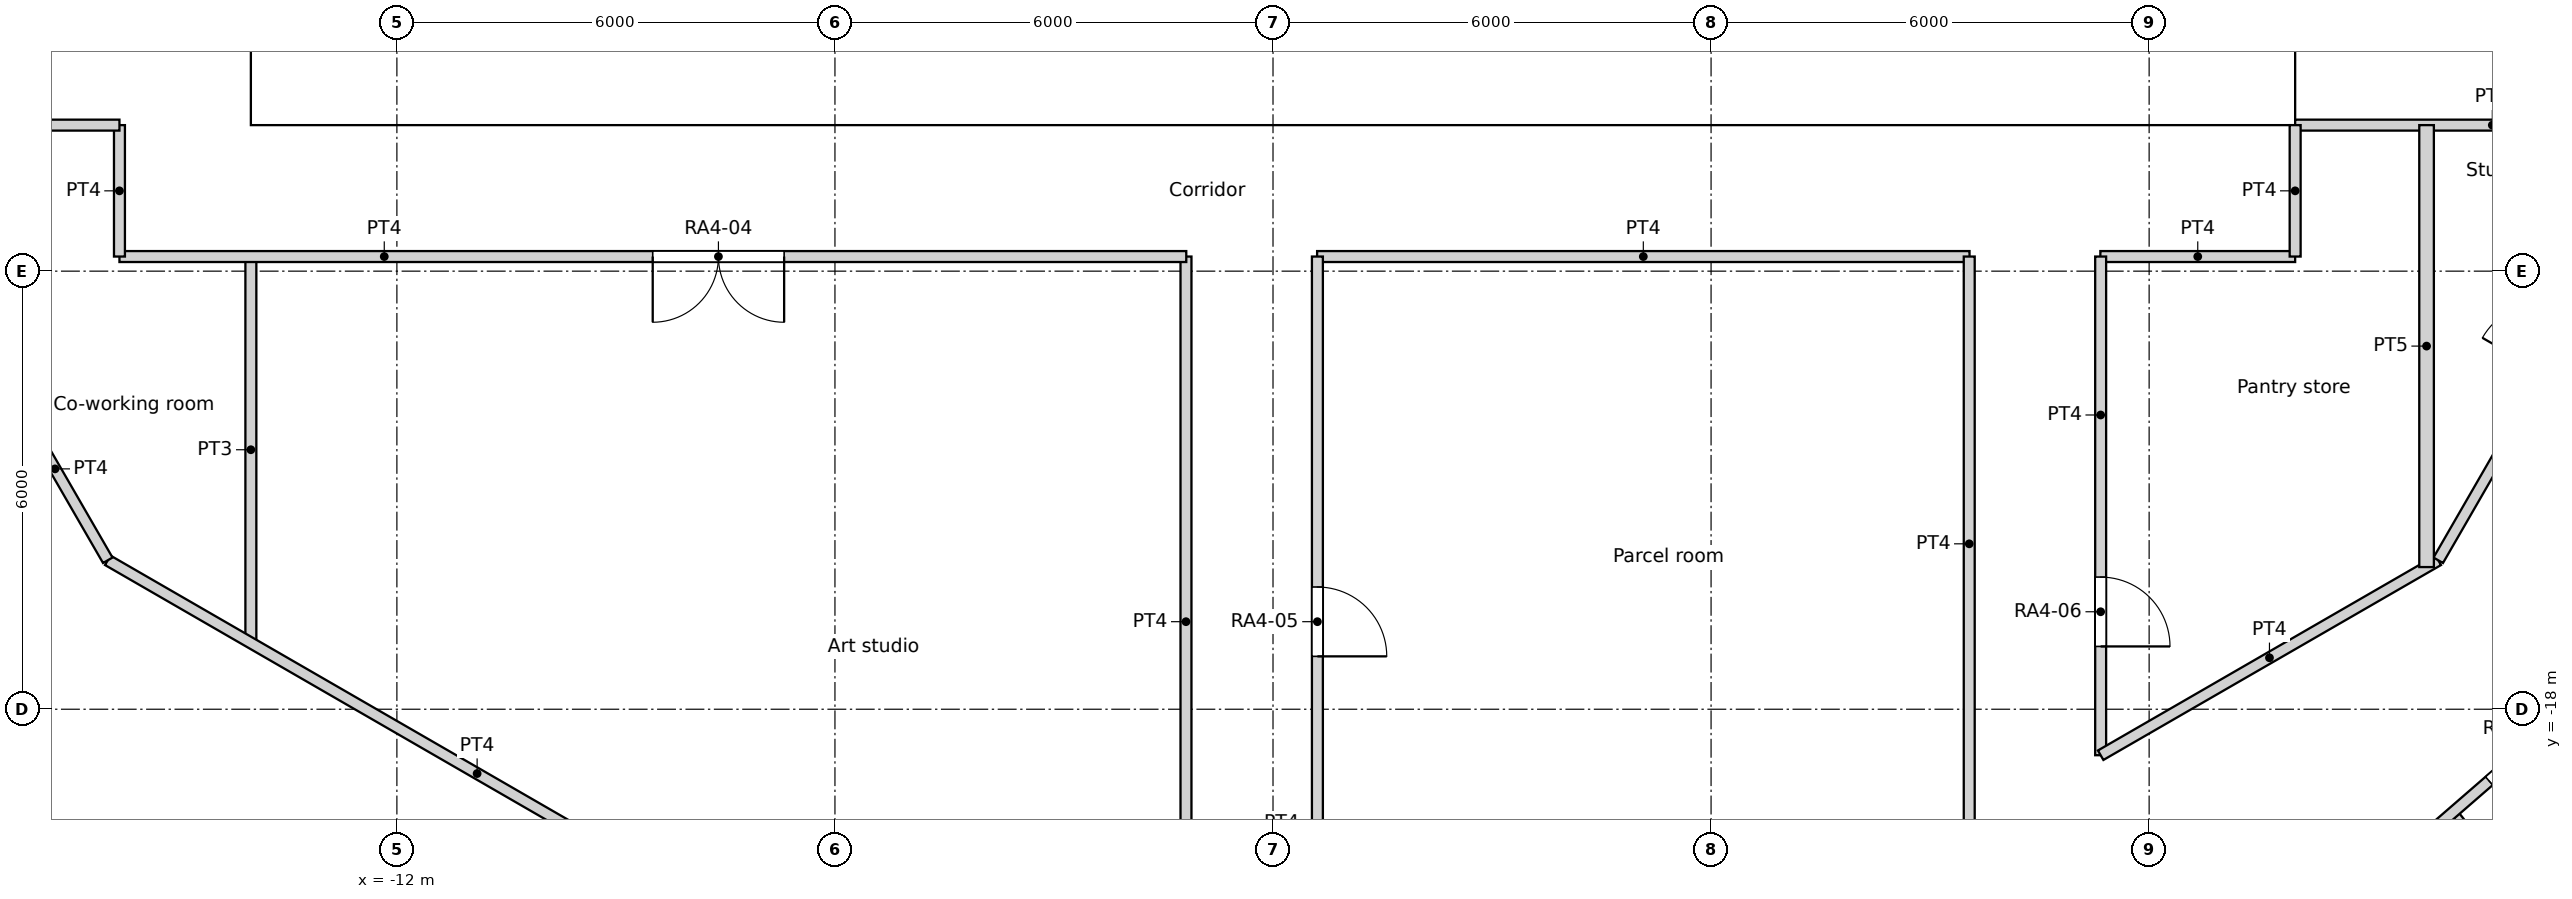
"""IFC4 building model, lengths in metres.
Left out: names, types, materials, properties, quantities, classifications, styles, units other than length and angle.
Written with IfcOpenShell. Run it as: python <this file> out.ifc"""

import sys

from ifc_helpers import new_model, si_unit, direction, frame, frame_2d, origin, origin_2d, place, context, subcontext, project, spatial, rectangle, circle, extrude, element, fill, save


model = new_model("IFC4")
c1 = context("Model", 3, precision=1e-05, world=origin(), true_north=direction((0.0, 1.0)))
c2 = subcontext(c1, "Body", "Model", "MODEL_VIEW")
j1 = project(units=[si_unit("LENGTHUNIT", "METRE"), si_unit("PLANEANGLEUNIT", "RADIAN")], contexts=[c1])
p1 = place(None, origin())
s1 = spatial("IfcSite", under=j1, at=p1, CompositionType="ELEMENT")
p2 = place(p1, origin())
s2 = spatial("IfcBuilding", under=s1, at=p2, CompositionType="ELEMENT")
p3 = place(p2, frame((0.0, 0.0, 60.6)))
s3 = spatial("IfcBuildingStorey", under=s2, at=p3, CompositionType="ELEMENT", Elevation=60.6)
for number, where, z_axis, x_axis in (
    (1, (-16.846, -17.855, 0.0), (0.0, 0.0, 1.0), (1.0, 0.0, 0.0)),
    (2, (14.659, -19.69, 0.0), (0.0, 0.0, 1.0), (1.0, 0.0, 0.0)),
):
    element("IfcColumn", number, at=place(p3, frame(where, z_axis=z_axis, x_axis=x_axis)), inside=s3, PredefinedType="COLUMN", context=c2, shape_type="SweptSolid", body=[
        extrude(circle(Radius=0.75, at=origin_2d()), origin(), (0.0, 0.0, 1.0), 3.6),
    ])
for number, where, z_axis, x_axis in (
    (3, (-13.798, -12.802, 0.0), (0.0, 0.0, 1.0), (1.0, 0.0, 0.0)),
    (4, (-9.411, -16.301, 0.0), (0.0, 0.0, 1.0), (1.0, 0.0, 0.0)),
    (5, (-4.188, -18.35, 0.0), (0.0, 0.0, 1.0), (1.0, 0.0, 0.0)),
    (6, (1.406, -18.77, 0.0), (0.0, 0.0, 1.0), (1.0, 0.0, 0.0)),
    (7, (6.876, -17.521, 0.0), (0.0, 0.0, 1.0), (1.0, 0.0, 0.0)),
    (8, (11.735, -14.716, 0.0), (0.0, 0.0, 1.0), (1.0, 0.0, 0.0)),
    (9, (15.552, -10.603, 0.0), (0.0, 0.0, 1.0), (1.0, 0.0, 0.0)),
):
    element("IfcColumn", number, at=place(p3, frame(where, z_axis=z_axis, x_axis=x_axis)), inside=s3, PredefinedType="COLUMN", context=c2, shape_type="SweptSolid", body=[
        extrude(circle(Radius=0.8, at=origin_2d()), origin(), (0.0, 0.0, 1.0), 3.6),
    ])
p4 = place(p3, frame((-14.0, -9.4, 0.0), z_axis=(0.0, 0.0, 1.0), x_axis=(1.0, 0.0, 0.0)))
e10 = element("IfcWall", 10, at=p4, inside=s3, PredefinedType="SOLIDWALL", context=c2, shape_type="SweptSolid", body=[
    extrude(rectangle(XDim=28.0, YDim=1.2, at=frame_2d((14.0, 0.0))), origin(), (0.0, 0.0, 1.0), 3.6),
])
p5 = place(p4, frame((14.9, 0.0, 0.0)))
e11 = element("IfcOpeningElement", 11, at=p5, cuts=e10, PredefinedType="OPENING", context=c2, shape_type="SweptSolid", body=[
    extrude(rectangle(XDim=1.0, YDim=2.1, at=frame_2d((0.5, 1.05))), frame((0.0, 0.6, 0.0), z_axis=(0.0, -1.0, 0.0), x_axis=(1.0, 0.0, 0.0)), (0.0, 0.0, 1.0), 1.2),
])
p6 = place(p4, frame((9.8, 0.0, 0.0)))
e12 = element("IfcOpeningElement", 12, at=p6, cuts=e10, PredefinedType="OPENING", context=c2, shape_type="SweptSolid", body=[
    extrude(rectangle(XDim=1.8, YDim=2.1, at=frame_2d((0.9, 1.05))), frame((0.0, 0.6, 0.0), z_axis=(0.0, -1.0, 0.0), x_axis=(1.0, 0.0, 0.0)), (0.0, 0.0, 1.0), 1.2),
])
p7 = place(p4, frame((16.4, 0.0, 0.0)))
e13 = element("IfcOpeningElement", 13, at=p7, cuts=e10, PredefinedType="OPENING", context=c2, shape_type="SweptSolid", body=[
    extrude(rectangle(XDim=1.8, YDim=2.1, at=frame_2d((0.9, 1.05))), frame((0.0, 0.6, 0.0), z_axis=(0.0, -1.0, 0.0), x_axis=(1.0, 0.0, 0.0)), (0.0, 0.0, 1.0), 1.2),
])
p8 = place(p3, frame((-15.8, -11.8, 0.0), z_axis=(0.0, 0.0, 1.0), x_axis=(1.0, 0.0, 0.0)))
e14 = element("IfcWall", 14, at=p8, inside=s3, PredefinedType="PARTITIONING", context=c2, shape_type="SweptSolid", body=[
    extrude(rectangle(XDim=14.612, YDim=0.15, at=frame_2d((7.306, 0.0))), origin(), (0.0, 0.0, 1.0), 3.15),
])
p9 = place(p8, frame((7.304, 0.0, 0.0)))
e15 = element("IfcOpeningElement", 15, at=p9, cuts=e14, PredefinedType="OPENING", context=c2, shape_type="SweptSolid", body=[
    extrude(rectangle(XDim=1.8, YDim=2.1, at=frame_2d((0.9, 1.05))), frame((0.0, 0.075, 0.0), z_axis=(0.0, -1.0, 0.0), x_axis=(1.0, 0.0, 0.0)), (0.0, 0.0, 1.0), 0.15),
])
p10 = place(p3, frame((0.604, -11.8, 0.0), z_axis=(0.0, 0.0, 1.0), x_axis=(1.0, 0.0, 0.0)))
e16 = element("IfcWall", 16, at=p10, inside=s3, PredefinedType="PARTITIONING", context=c2, shape_type="SweptSolid", body=[
    extrude(rectangle(XDim=8.936, YDim=0.15, at=frame_2d((4.468, 0.0))), origin(), (0.0, 0.0, 1.0), 3.15),
])
p11 = place(p3, frame((14.0, -11.8, 0.0), z_axis=(0.0, 0.0, 1.0), x_axis=(0.0, 1.0, 0.0)))
e17 = element("IfcWall", 17, at=p11, inside=s3, PredefinedType="PARTITIONING", context=c2, shape_type="SweptSolid", body=[
    extrude(rectangle(XDim=1.8, YDim=0.15, at=frame_2d((0.9, 0.0))), origin(), (0.0, 0.0, 1.0), 3.15),
])
p12 = place(p3, frame((11.332, -11.8, 0.0), z_axis=(0.0, 0.0, 1.0), x_axis=(1.0, 0.0, 0.0)))
e18 = element("IfcWall", 18, at=p12, inside=s3, PredefinedType="PARTITIONING", context=c2, shape_type="SweptSolid", body=[
    extrude(rectangle(XDim=2.668, YDim=0.15, at=frame_2d((1.334, 0.0))), origin(), (0.0, 0.0, 1.0), 3.15),
])
p13 = place(p3, frame((-15.8, -11.8, 0.0), z_axis=(0.0, 0.0, 1.0), x_axis=(0.0, 1.0, 0.0)))
e19 = element("IfcWall", 19, at=p13, inside=s3, PredefinedType="PARTITIONING", context=c2, shape_type="SweptSolid", body=[
    extrude(rectangle(XDim=1.8, YDim=0.15, at=frame_2d((0.9, 0.0))), origin(), (0.0, 0.0, 1.0), 3.15),
])
p14 = place(p3, frame((14.0, -10.0, 0.0), z_axis=(0.0, 0.0, 1.0), x_axis=(1.0, 0.0, 0.0)))
e20 = element("IfcWall", 20, at=p14, inside=s3, PredefinedType="PARTITIONING", context=c2, shape_type="SweptSolid", body=[
    extrude(rectangle(XDim=5.401, YDim=0.15, at=frame_2d((2.7, 0.0))), origin(), (0.0, 0.0, 1.0), 3.15),
])
p15 = place(p3, frame((15.96, -15.96, 0.0), z_axis=(0.0, 0.0, 1.0), x_axis=(0.499992689227, 0.86602962462, 0.0)))
e21 = element("IfcWall", 21, at=p15, inside=s3, PredefinedType="PARTITIONING", context=c2, shape_type="SweptSolid", body=[
    extrude(rectangle(XDim=6.882, YDim=0.15, at=frame_2d((3.441, 0.0))), origin(), (0.0, 0.0, 1.0), 3.15),
])
p16 = place(p15, frame((2.941, 0.0, 0.0)))
e22 = element("IfcOpeningElement", 22, at=p16, cuts=e21, PredefinedType="OPENING", context=c2, shape_type="SweptSolid", body=[
    extrude(rectangle(XDim=1.0, YDim=2.04, at=frame_2d((0.5, 1.02))), frame((0.0, 0.075, 0.0), z_axis=(0.0, -1.0, 0.0), x_axis=(1.0, 0.0, 0.0)), (0.0, 0.0, 1.0), 0.15),
])
p17 = place(p3, frame((13.247, -21.939, 0.0), z_axis=(0.0, 0.0, 1.0), x_axis=(0.755420750547, 0.655240024451, 0.0)))
e23 = element("IfcWall", 23, at=p17, inside=s3, PredefinedType="PARTITIONING", context=c2, shape_type="SweptSolid", body=[
    extrude(rectangle(XDim=11.771, YDim=0.15, at=frame_2d((5.885, 0.0))), origin(), (0.0, 0.0, 1.0), 3.15),
])
p18 = place(p17, frame((4.513, 0.0, 0.0)))
e24 = element("IfcOpeningElement", 24, at=p18, cuts=e23, PredefinedType="OPENING", context=c2, shape_type="SweptSolid", body=[
    extrude(rectangle(XDim=1.0, YDim=2.1, at=frame_2d((0.5, 1.05))), frame((0.0, 0.075, 0.0), z_axis=(0.0, -1.0, 0.0), x_axis=(1.0, 0.0, 0.0)), (0.0, 0.0, 1.0), 0.15),
])
p19 = place(p3, frame((-19.401, -10.0, 0.0), z_axis=(0.0, 0.0, 1.0), x_axis=(1.0, 0.0, 0.0)))
e25 = element("IfcWall", 25, at=p19, inside=s3, PredefinedType="PARTITIONING", context=c2, shape_type="SweptSolid", body=[
    extrude(rectangle(XDim=3.601, YDim=0.15, at=frame_2d((1.8, 0.0))), origin(), (0.0, 0.0, 1.0), 3.15),
])
p20 = place(p3, frame((-19.401, -10.0, 0.0), z_axis=(0.0, 0.0, 1.0), x_axis=(0.499992689227, -0.86602962462, 0.0)))
e26 = element("IfcWall", 26, at=p20, inside=s3, PredefinedType="PARTITIONING", context=c2, shape_type="SweptSolid", body=[
    extrude(rectangle(XDim=6.882, YDim=0.15, at=frame_2d((3.441, 0.0))), origin(), (0.0, 0.0, 1.0), 3.15),
])
p21 = place(p20, frame((2.941, 0.0, 0.0)))
e27 = element("IfcOpeningElement", 27, at=p21, cuts=e26, PredefinedType="OPENING", context=c2, shape_type="SweptSolid", body=[
    extrude(rectangle(XDim=1.0, YDim=2.04, at=frame_2d((0.5, 1.02))), frame((0.0, 0.075, 0.0), z_axis=(0.0, -1.0, 0.0), x_axis=(1.0, 0.0, 0.0)), (0.0, 0.0, 1.0), 0.15),
])
p22 = place(p3, frame((-15.96, -15.96, 0.0), z_axis=(0.0, 0.0, 1.0), x_axis=(0.866022730501, -0.500004630234, 0.0)))
e28 = element("IfcWall", 28, at=p22, inside=s3, PredefinedType="PARTITIONING", context=c2, shape_type="SweptSolid", body=[
    extrude(rectangle(XDim=11.684, YDim=0.15, at=frame_2d((5.842, 0.0))), origin(), (0.0, 0.0, 1.0), 3.15),
])
p23 = place(p3, frame((-1.192, -21.802, 0.0), z_axis=(0.0, 0.0, 1.0), x_axis=(0.0, 1.0, 0.0)))
e29 = element("IfcWall", 29, at=p23, inside=s3, PredefinedType="PARTITIONING", context=c2, shape_type="SweptSolid", body=[
    extrude(rectangle(XDim=10.002, YDim=0.15, at=frame_2d((5.001, 0.0))), origin(), (0.0, 0.0, 1.0), 3.15),
])
p24 = place(p3, frame((0.608, -21.802, 0.0), z_axis=(0.0, 0.0, 1.0), x_axis=(0.0, 1.0, 0.0)))
e30 = element("IfcWall", 30, at=p24, inside=s3, PredefinedType="PARTITIONING", context=c2, shape_type="SweptSolid", body=[
    extrude(rectangle(XDim=10.002, YDim=0.15, at=frame_2d((5.001, 0.0))), origin(), (0.0, 0.0, 1.0), 3.15),
])
p25 = place(p24, frame((4.526, 0.0, 0.0)))
e31 = element("IfcOpeningElement", 31, at=p25, cuts=e30, PredefinedType="OPENING", context=c2, shape_type="SweptSolid", body=[
    extrude(rectangle(XDim=0.95, YDim=2.1, at=frame_2d((0.475, 1.05))), frame((0.0, 0.075, 0.0), z_axis=(0.0, -1.0, 0.0), x_axis=(1.0, 0.0, 0.0)), (0.0, 0.0, 1.0), 0.15),
])
p26 = place(p3, frame((9.536, -19.669, 0.0), z_axis=(0.0, 0.0, 1.0), x_axis=(0.0, 1.0, 0.0)))
e32 = element("IfcWall", 32, at=p26, inside=s3, PredefinedType="PARTITIONING", context=c2, shape_type="SweptSolid", body=[
    extrude(rectangle(XDim=7.869, YDim=0.15, at=frame_2d((3.935, 0.0))), origin(), (0.0, 0.0, 1.0), 3.15),
])
p27 = place(p3, frame((11.336, -18.63, 0.0), z_axis=(0.0, 0.0, 1.0), x_axis=(0.0, 1.0, 0.0)))
e33 = element("IfcWall", 33, at=p27, inside=s3, PredefinedType="PARTITIONING", context=c2, shape_type="SweptSolid", body=[
    extrude(rectangle(XDim=6.83, YDim=0.15, at=frame_2d((3.415, 0.0))), origin(), (0.0, 0.0, 1.0), 3.15),
])
p28 = place(p27, frame((1.49, 0.0, 0.0)))
e34 = element("IfcOpeningElement", 34, at=p28, cuts=e33, PredefinedType="OPENING", context=c2, shape_type="SweptSolid", body=[
    extrude(rectangle(XDim=0.95, YDim=2.1, at=frame_2d((0.475, 1.05))), frame((0.0, 0.075, 0.0), z_axis=(0.0, -1.0, 0.0), x_axis=(1.0, 0.0, 0.0)), (0.0, 0.0, 1.0), 0.15),
])
p29 = place(p3, frame((11.336, -18.63, 0.0), z_axis=(0.0, 0.0, 1.0), x_axis=(0.866056911224, 0.499945423543, 0.0)))
e35 = element("IfcWall", 35, at=p29, inside=s3, PredefinedType="PARTITIONING", context=c2, shape_type="SweptSolid", body=[
    extrude(rectangle(XDim=5.339, YDim=0.15, at=frame_2d((2.67, 0.0))), origin(), (0.0, 0.0, 1.0), 3.15),
])
p30 = place(p3, frame((-14.0, -17.092, 0.0), z_axis=(0.0, 0.0, 1.0), x_axis=(0.0, 1.0, 0.0)))
e36 = element("IfcWall", 36, at=p30, inside=s3, PredefinedType="PARTITIONING", context=c2, shape_type="SweptSolid", body=[
    extrude(rectangle(XDim=5.292, YDim=0.15, at=frame_2d((2.646, 0.0))), origin(), (0.0, 0.0, 1.0), 3.15),
])
p31 = place(p3, frame((15.8, -16.053, 0.0), z_axis=(0.0, 0.0, 1.0), x_axis=(0.0, 1.0, 0.0)))
e37 = element("IfcWall", 37, at=p31, inside=s3, PredefinedType="PARTITIONING", context=c2, shape_type="SweptSolid", body=[
    extrude(rectangle(XDim=6.053, YDim=0.2, at=frame_2d((3.026, 0.0))), origin(), (0.0, 0.0, 1.0), 3.15),
])
p32 = place(p3, frame((16.168, -19.404, 0.0), z_axis=(0.0, 0.0, 1.0), x_axis=(0.618142414415, -0.786066126672, 0.0)))
e38 = element("IfcWall", 38, at=p32, inside=s3, PredefinedType="PARTITIONING", context=c2, shape_type="SweptSolid", body=[
    extrude(rectangle(XDim=2.453, YDim=0.1, at=frame_2d((1.226, 0.0))), origin(), (0.0, 0.0, 1.0), 3.15),
])
p33 = place(p32, frame((0.777, 0.0, 0.0)))
e39 = element("IfcOpeningElement", 39, at=p33, cuts=e38, PredefinedType="OPENING", context=c2, shape_type="SweptSolid", body=[
    extrude(rectangle(XDim=0.9, YDim=2.04, at=frame_2d((0.45, 1.02))), frame((0.0, 0.05, 0.0), z_axis=(0.0, -1.0, 0.0), x_axis=(1.0, 0.0, 0.0)), (0.0, 0.0, 1.0), 0.1),
])
p34 = place(p5, origin())
e40 = element("IfcDoor", 40, at=p34, inside=s3, OperationType="SINGLE_SWING_LEFT", PredefinedType="DOOR", context=c2, shape_type="SweptSolid", body=[
    extrude(rectangle(XDim=1.0, YDim=2.1, at=frame_2d((0.5, 1.05))), frame((0.0, 0.025, 0.0), z_axis=(0.0, -1.0, 0.0), x_axis=(1.0, 0.0, 0.0)), (0.0, 0.0, 1.0), 0.05),
])
fill(e11, e40)
p35 = place(p6, origin())
e41 = element("IfcDoor", 41, at=p35, inside=s3, OperationType="DOUBLE_DOOR_SINGLE_SWING", PredefinedType="DOOR", context=c2, shape_type="SweptSolid", body=[
    extrude(rectangle(XDim=1.8, YDim=2.1, at=frame_2d((0.9, 1.05))), frame((0.0, 0.025, 0.0), z_axis=(0.0, -1.0, 0.0), x_axis=(1.0, 0.0, 0.0)), (0.0, 0.0, 1.0), 0.05),
])
fill(e12, e41)
p36 = place(p7, origin())
e42 = element("IfcDoor", 42, at=p36, inside=s3, OperationType="DOUBLE_DOOR_SINGLE_SWING", PredefinedType="DOOR", context=c2, shape_type="SweptSolid", body=[
    extrude(rectangle(XDim=1.8, YDim=2.1, at=frame_2d((0.9, 1.05))), frame((0.0, 0.025, 0.0), z_axis=(0.0, -1.0, 0.0), x_axis=(1.0, 0.0, 0.0)), (0.0, 0.0, 1.0), 0.05),
])
fill(e13, e42)
p37 = place(p9, origin())
e43 = element("IfcDoor", 43, at=p37, inside=s3, OperationType="DOUBLE_DOOR_SINGLE_SWING", PredefinedType="DOOR", context=c2, shape_type="SweptSolid", body=[
    extrude(rectangle(XDim=1.8, YDim=2.1, at=frame_2d((0.9, 1.05))), frame((0.0, 0.025, 0.0), z_axis=(0.0, -1.0, 0.0), x_axis=(1.0, 0.0, 0.0)), (0.0, 0.0, 1.0), 0.05),
])
fill(e15, e43)
p38 = place(p25, origin())
e44 = element("IfcDoor", 44, at=p38, inside=s3, OperationType="SINGLE_SWING_RIGHT", PredefinedType="DOOR", context=c2, shape_type="SweptSolid", body=[
    extrude(rectangle(XDim=0.95, YDim=2.1, at=frame_2d((0.475, 1.05))), frame((0.0, 0.025, 0.0), z_axis=(0.0, -1.0, 0.0), x_axis=(1.0, 0.0, 0.0)), (0.0, 0.0, 1.0), 0.05),
])
fill(e31, e44)
p39 = place(p28, origin())
e45 = element("IfcDoor", 45, at=p39, inside=s3, OperationType="SINGLE_SWING_RIGHT", PredefinedType="DOOR", context=c2, shape_type="SweptSolid", body=[
    extrude(rectangle(XDim=0.95, YDim=2.1, at=frame_2d((0.475, 1.05))), frame((0.0, 0.025, 0.0), z_axis=(0.0, -1.0, 0.0), x_axis=(1.0, 0.0, 0.0)), (0.0, 0.0, 1.0), 0.05),
])
fill(e34, e45)
p40 = place(p18, origin())
e46 = element("IfcDoor", 46, at=p40, inside=s3, OperationType="SINGLE_SWING_LEFT", PredefinedType="DOOR", context=c2, shape_type="SweptSolid", body=[
    extrude(rectangle(XDim=1.0, YDim=2.1, at=frame_2d((0.5, 1.05))), frame((0.0, 0.025, 0.0), z_axis=(0.0, -1.0, 0.0), x_axis=(1.0, 0.0, 0.0)), (0.0, 0.0, 1.0), 0.05),
])
fill(e24, e46)
save(model, sys.argv[1])
